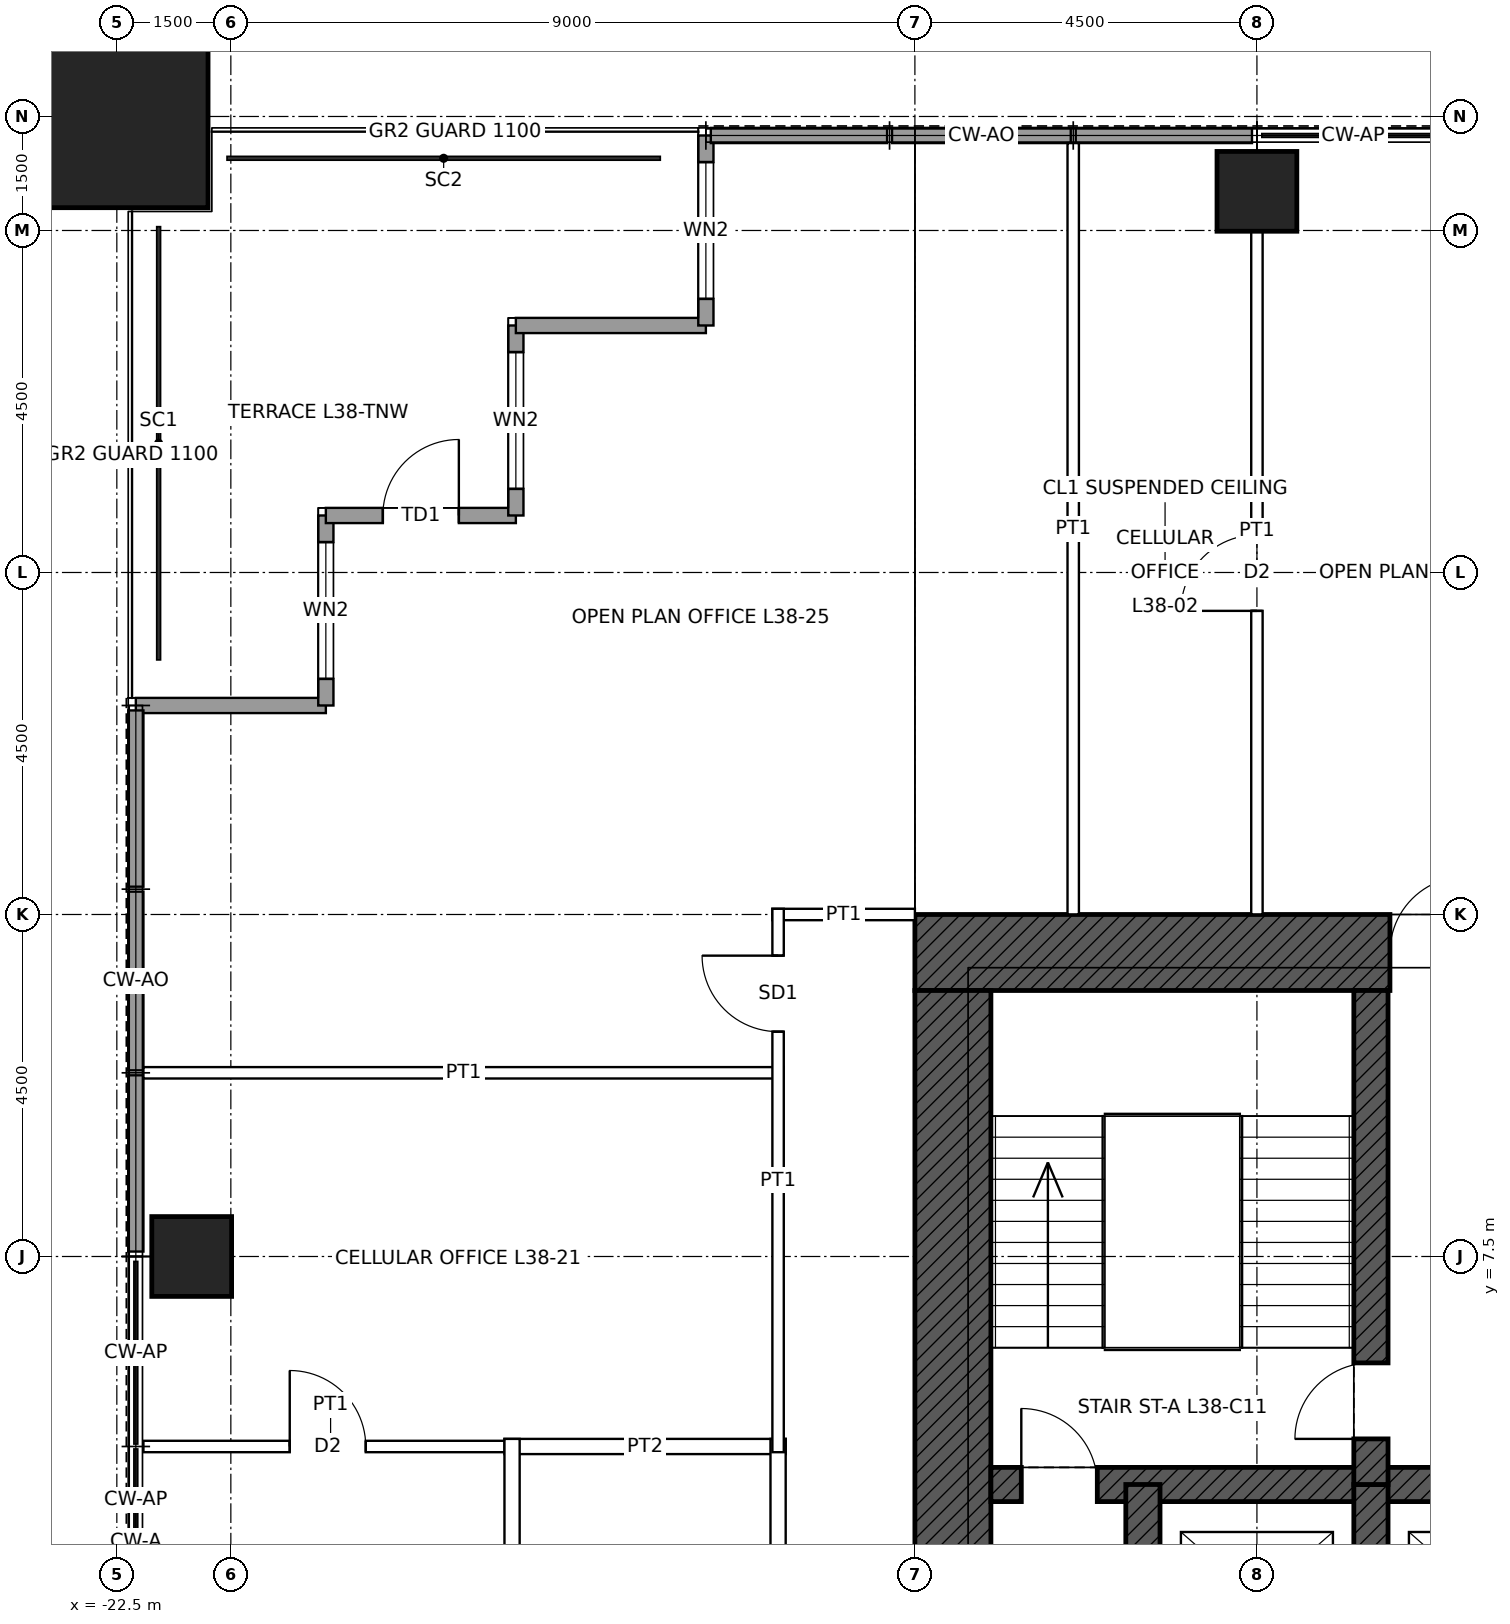
"""IFC4 building model, lengths in metres.
Left out: names, types, materials, properties, quantities, classifications, styles, units other than length and angle.
Written with IfcOpenShell. Run it as: python <this file> out.ifc"""

import sys

from ifc_helpers import new_model, si_unit, direction, frame, frame_2d, origin, origin_2d, place, context, subcontext, project, spatial, rectangle, hollow_rectangle, extrude, element, fill, save


model = new_model("IFC4")
c1 = context("Model", 3, precision=1e-05, world=origin(), true_north=direction((0.0, 1.0)))
c2 = subcontext(c1, "Body", "Model", "MODEL_VIEW")
j1 = project(units=[si_unit("LENGTHUNIT", "METRE"), si_unit("PLANEANGLEUNIT", "RADIAN")], contexts=[c1])
p1 = place(None, origin())
s1 = spatial("IfcSite", under=j1, at=p1, CompositionType="ELEMENT")
p2 = place(p1, origin())
s2 = spatial("IfcBuilding", under=s1, at=p2, CompositionType="ELEMENT")
p3 = place(p2, frame((0.0, 0.0, 185.9)))
s3 = spatial("IfcBuildingStorey", under=s2, at=p3, CompositionType="ELEMENT", Elevation=185.9)
p4 = place(p3, frame((-22.5, 22.5, 0.0), z_axis=(0.0, 0.0, 1.0), x_axis=(1.0, 0.0, 0.0)))
e1 = element("IfcColumn", 1, at=p4, inside=s3, PredefinedType="COLUMN", context=c2, shape_type="SweptSolid", body=[
    extrude(hollow_rectangle(XDim=2.4, YDim=2.4, WallThickness=0.12, at=origin_2d()), origin(), (0.0, 0.0, 1.0), 4.0),
])
for number, where, z_axis, x_axis in (
    (2, (-7.5, 21.515, 0.0), (0.0, 0.0, 1.0), (1.0, 0.0, 0.0)),
    (3, (-21.515, 7.5, 0.0), (0.0, 0.0, 1.0), (1.0, 0.0, 0.0)),
):
    element("IfcColumn", number, at=place(p3, frame(where, z_axis=z_axis, x_axis=x_axis)), inside=s3, PredefinedType="COLUMN", context=c2, shape_type="SweptSolid", body=[
        extrude(hollow_rectangle(XDim=1.05, YDim=1.05, WallThickness=0.07, at=origin_2d()), origin(), (0.0, 0.0, 1.0), 4.0),
    ])
p5 = place(p3, frame((-12.0, 11.5, 0.0), z_axis=(0.0, 0.0, 1.0), x_axis=(1.0, 0.0, 0.0)))
e4 = element("IfcWall", 4, at=p5, inside=s3, PredefinedType="SHEAR", context=c2, shape_type="SweptSolid", body=[
    extrude(rectangle(XDim=24.0, YDim=1.0, at=frame_2d((12.0, 0.0))), origin(), (0.0, 0.0, 1.0), 4.0),
])
p6 = place(p5, frame((6.25, 0.0, 0.0)))
e5 = element("IfcOpeningElement", 5, at=p6, cuts=e4, PredefinedType="OPENING", context=c2, shape_type="SweptSolid", body=[
    extrude(rectangle(XDim=1.0, YDim=2.4, at=frame_2d((0.5, 1.2))), frame((0.0, 0.51, 0.0), z_axis=(0.0, -1.0, 0.0), x_axis=(1.0, 0.0, 0.0)), (0.0, 0.0, 1.0), 1.02),
])
p7 = place(p5, frame((16.75, 0.0, 0.0)))
e6 = element("IfcOpeningElement", 6, at=p7, cuts=e4, PredefinedType="OPENING", context=c2, shape_type="SweptSolid", body=[
    extrude(rectangle(XDim=1.0, YDim=2.4, at=frame_2d((0.5, 1.2))), frame((0.0, 0.51, 0.0), z_axis=(0.0, -1.0, 0.0), x_axis=(1.0, 0.0, 0.0)), (0.0, 0.0, 1.0), 1.02),
])
p8 = place(p3, frame((-11.5, -11.0, 0.0), z_axis=(0.0, 0.0, 1.0), x_axis=(0.0, 1.0, 0.0)))
e7 = element("IfcWall", 7, at=p8, inside=s3, PredefinedType="SHEAR", context=c2, shape_type="SweptSolid", body=[
    extrude(rectangle(XDim=22.0, YDim=1.0, at=frame_2d((11.0, 0.0))), origin(), (0.0, 0.0, 1.0), 4.0),
])
p9 = place(p8, frame((10.5, 0.0, 0.0)))
e8 = element("IfcOpeningElement", 8, at=p9, cuts=e7, PredefinedType="OPENING", context=c2, shape_type="SweptSolid", body=[
    extrude(rectangle(XDim=1.0, YDim=2.4, at=frame_2d((0.5, 1.2))), frame((0.0, 0.51, 0.0), z_axis=(0.0, -1.0, 0.0), x_axis=(1.0, 0.0, 0.0)), (0.0, 0.0, 1.0), 1.02),
])
p10 = place(p3, frame((-11.0, 4.5, 0.0), z_axis=(0.0, 0.0, 1.0), x_axis=(1.0, 0.0, 0.0)))
e9 = element("IfcWall", 9, at=p10, inside=s3, PredefinedType="SHEAR", context=c2, shape_type="SweptSolid", body=[
    extrude(rectangle(XDim=22.0, YDim=0.45, at=frame_2d((11.0, 0.0))), origin(), (0.0, 0.0, 1.0), 4.0),
])
p11 = place(p10, frame((0.4, 0.0, 0.0)))
e10 = element("IfcOpeningElement", 10, at=p11, cuts=e9, PredefinedType="OPENING", context=c2, shape_type="SweptSolid", body=[
    extrude(rectangle(XDim=1.0, YDim=2.1, at=frame_2d((0.5, 1.05))), frame((0.0, 0.235, 0.0), z_axis=(0.0, -1.0, 0.0), x_axis=(1.0, 0.0, 0.0)), (0.0, 0.0, 1.0), 0.47),
])
p12 = place(p10, frame((20.6, 0.0, 0.0)))
e11 = element("IfcOpeningElement", 11, at=p12, cuts=e9, PredefinedType="OPENING", context=c2, shape_type="SweptSolid", body=[
    extrude(rectangle(XDim=1.0, YDim=2.1, at=frame_2d((0.5, 1.05))), frame((0.0, 0.235, 0.0), z_axis=(0.0, -1.0, 0.0), x_axis=(1.0, 0.0, 0.0)), (0.0, 0.0, 1.0), 0.47),
])
for number, where, z_axis, x_axis in (
    (12, (-9.0, 1.5, 0.0), (0.0, 0.0, 1.0), (0.0, 1.0, 0.0)),
    (13, (-6.0, 1.5, 0.0), (0.0, 0.0, 1.0), (0.0, 1.0, 0.0)),
):
    element("IfcWall", number, at=place(p3, frame(where, z_axis=z_axis, x_axis=x_axis)), inside=s3, PredefinedType="SHEAR", context=c2, shape_type="SweptSolid", body=[
        extrude(rectangle(XDim=3.0, YDim=0.45, at=frame_2d((1.5, 0.0))), origin(), (0.0, 0.0, 1.0), 4.0),
    ])
p13 = place(p3, frame((-6.0, 4.5, 0.0), z_axis=(0.0, 0.0, 1.0), x_axis=(0.0, 1.0, 0.0)))
e14 = element("IfcWall", 14, at=p13, inside=s3, PredefinedType="SHEAR", context=c2, shape_type="SweptSolid", body=[
    extrude(rectangle(XDim=6.5, YDim=0.45, at=frame_2d((3.25, 0.0))), origin(), (0.0, 0.0, 1.0), 4.0),
])
p14 = place(p13, frame((0.6, 0.0, 0.0)))
e15 = element("IfcOpeningElement", 15, at=p14, cuts=e14, PredefinedType="OPENING", context=c2, shape_type="SweptSolid", body=[
    extrude(rectangle(XDim=1.0, YDim=2.1, at=frame_2d((0.5, 1.05))), frame((0.0, 0.235, 0.0), z_axis=(0.0, -1.0, 0.0), x_axis=(1.0, 0.0, 0.0)), (0.0, 0.0, 1.0), 0.47),
])
p15 = place(p3, frame((-22.25, 14.75, 0.0), z_axis=(0.0, 0.0, 1.0), x_axis=(1.0, 0.0, 0.0)))
e16 = element("IfcWall", 16, at=p15, inside=s3, PredefinedType="SOLIDWALL", context=c2, shape_type="SweptSolid", body=[
    extrude(rectangle(XDim=2.5, YDim=0.2, at=frame_2d((1.25, 0.0))), origin(), (0.0, 0.0, 1.0), 3.85),
])
p16 = place(p3, frame((-19.75, 14.75, 0.0), z_axis=(0.0, 0.0, 1.0), x_axis=(0.0, 1.0, 0.0)))
e17 = element("IfcWall", 17, at=p16, inside=s3, PredefinedType="SOLIDWALL", context=c2, shape_type="SweptSolid", body=[
    extrude(rectangle(XDim=2.5, YDim=0.2, at=frame_2d((1.25, 0.0))), origin(), (0.0, 0.0, 1.0), 3.85),
])
p17 = place(p16, frame((0.35, 0.0, 0.3)))
e18 = element("IfcOpeningElement", 18, at=p17, cuts=e17, PredefinedType="OPENING", context=c2, shape_type="SweptSolid", body=[
    extrude(rectangle(XDim=1.8, YDim=2.4, at=frame_2d((0.9, 1.2))), frame((0.0, 0.11, 0.0), z_axis=(0.0, -1.0, 0.0), x_axis=(1.0, 0.0, 0.0)), (0.0, 0.0, 1.0), 0.22),
])
p18 = place(p3, frame((-19.75, 17.25, 0.0), z_axis=(0.0, 0.0, 1.0), x_axis=(1.0, 0.0, 0.0)))
e19 = element("IfcWall", 19, at=p18, inside=s3, PredefinedType="SOLIDWALL", context=c2, shape_type="SweptSolid", body=[
    extrude(rectangle(XDim=2.5, YDim=0.2, at=frame_2d((1.25, 0.0))), origin(), (0.0, 0.0, 1.0), 3.85),
])
p19 = place(p18, frame((0.75, 0.0, 0.0)))
e20 = element("IfcOpeningElement", 20, at=p19, cuts=e19, PredefinedType="OPENING", context=c2, shape_type="SweptSolid", body=[
    extrude(rectangle(XDim=1.0, YDim=2.4, at=frame_2d((0.5, 1.2))), frame((0.0, 0.11, 0.0), z_axis=(0.0, -1.0, 0.0), x_axis=(1.0, 0.0, 0.0)), (0.0, 0.0, 1.0), 0.22),
])
p20 = place(p3, frame((-17.25, 17.25, 0.0), z_axis=(0.0, 0.0, 1.0), x_axis=(0.0, 1.0, 0.0)))
e21 = element("IfcWall", 21, at=p20, inside=s3, PredefinedType="SOLIDWALL", context=c2, shape_type="SweptSolid", body=[
    extrude(rectangle(XDim=2.5, YDim=0.2, at=frame_2d((1.25, 0.0))), origin(), (0.0, 0.0, 1.0), 3.85),
])
p21 = place(p20, frame((0.35, 0.0, 0.3)))
e22 = element("IfcOpeningElement", 22, at=p21, cuts=e21, PredefinedType="OPENING", context=c2, shape_type="SweptSolid", body=[
    extrude(rectangle(XDim=1.8, YDim=2.4, at=frame_2d((0.9, 1.2))), frame((0.0, 0.11, 0.0), z_axis=(0.0, -1.0, 0.0), x_axis=(1.0, 0.0, 0.0)), (0.0, 0.0, 1.0), 0.22),
])
p22 = place(p3, frame((-17.25, 19.75, 0.0), z_axis=(0.0, 0.0, 1.0), x_axis=(1.0, 0.0, 0.0)))
e23 = element("IfcWall", 23, at=p22, inside=s3, PredefinedType="SOLIDWALL", context=c2, shape_type="SweptSolid", body=[
    extrude(rectangle(XDim=2.5, YDim=0.2, at=frame_2d((1.25, 0.0))), origin(), (0.0, 0.0, 1.0), 3.85),
])
p23 = place(p3, frame((-14.75, 19.75, 0.0), z_axis=(0.0, 0.0, 1.0), x_axis=(0.0, 1.0, 0.0)))
e24 = element("IfcWall", 24, at=p23, inside=s3, PredefinedType="SOLIDWALL", context=c2, shape_type="SweptSolid", body=[
    extrude(rectangle(XDim=2.5, YDim=0.2, at=frame_2d((1.25, 0.0))), origin(), (0.0, 0.0, 1.0), 3.85),
])
p24 = place(p23, frame((0.35, 0.0, 0.3)))
e25 = element("IfcOpeningElement", 25, at=p24, cuts=e24, PredefinedType="OPENING", context=c2, shape_type="SweptSolid", body=[
    extrude(rectangle(XDim=1.8, YDim=2.4, at=frame_2d((0.9, 1.2))), frame((0.0, 0.11, 0.0), z_axis=(0.0, -1.0, 0.0), x_axis=(1.0, 0.0, 0.0)), (0.0, 0.0, 1.0), 0.22),
])
p25 = place(p3, frame((-14.685, 22.25, 0.0), z_axis=(0.0, 0.0, 1.0), x_axis=(1.0, 0.0, 0.0)))
e26 = element("IfcWall", 26, at=p25, inside=s3, PredefinedType="SOLIDWALL", context=c2, shape_type="SweptSolid", body=[
    extrude(rectangle(XDim=2.319, YDim=0.2, at=frame_2d((1.16, 0.0))), origin(), (0.0, 0.0, 1.0), 3.85),
])
p26 = place(p3, frame((-12.301, 22.25, 0.0), z_axis=(0.0, 0.0, 1.0), x_axis=(1.0, 0.0, 0.0)))
e27 = element("IfcWall", 27, at=p26, inside=s3, PredefinedType="SOLIDWALL", context=c2, shape_type="SweptSolid", body=[
    extrude(rectangle(XDim=2.352, YDim=0.2, at=frame_2d((1.176, 0.0))), origin(), (0.0, 0.0, 1.0), 3.85),
])
for number, where, z_axis, x_axis in (
    (28, (-9.884, 22.25, 0.0), (0.0, 0.0, 1.0), (1.0, 0.0, 0.0)),
    (29, (-22.25, 7.565, 0.0), (0.0, 0.0, 1.0), (0.0, 1.0, 0.0)),
):
    element("IfcWall", number, at=place(p3, frame(where, z_axis=z_axis, x_axis=x_axis)), inside=s3, PredefinedType="SOLIDWALL", context=c2, shape_type="SweptSolid", body=[
        extrude(rectangle(XDim=2.319, YDim=0.2, at=frame_2d((1.16, 0.0))), origin(), (0.0, 0.0, 1.0), 3.85),
    ])
p27 = place(p3, frame((-22.25, 9.949, 0.0), z_axis=(0.0, 0.0, 1.0), x_axis=(0.0, 1.0, 0.0)))
e30 = element("IfcWall", 30, at=p27, inside=s3, PredefinedType="SOLIDWALL", context=c2, shape_type="SweptSolid", body=[
    extrude(rectangle(XDim=2.352, YDim=0.2, at=frame_2d((1.176, 0.0))), origin(), (0.0, 0.0, 1.0), 3.85),
])
p28 = place(p3, frame((-22.25, 12.366, 0.0), z_axis=(0.0, 0.0, 1.0), x_axis=(0.0, 1.0, 0.0)))
e31 = element("IfcWall", 31, at=p28, inside=s3, PredefinedType="SOLIDWALL", context=c2, shape_type="SweptSolid", body=[
    extrude(rectangle(XDim=2.319, YDim=0.2, at=frame_2d((1.16, 0.0))), origin(), (0.0, 0.0, 1.0), 3.85),
])
p29 = place(p3, frame((-22.15, 5.0, 0.0), z_axis=(0.0, 0.0, 1.0), x_axis=(1.0, 0.0, 0.0)))
e32 = element("IfcWall", 32, at=p29, inside=s3, PredefinedType="PARTITIONING", context=c2, shape_type="SweptSolid", body=[
    extrude(rectangle(XDim=4.925, YDim=0.15, at=frame_2d((2.462, 0.0))), origin(), (0.0, 0.0, 1.0), 3.85),
])
p30 = place(p29, frame((1.925, 0.0, 0.0)))
e33 = element("IfcOpeningElement", 33, at=p30, cuts=e32, PredefinedType="OPENING", context=c2, shape_type="SweptSolid", body=[
    extrude(rectangle(XDim=1.0, YDim=2.1, at=frame_2d((0.5, 1.05))), frame((0.0, 0.085, 0.0), z_axis=(0.0, -1.0, 0.0), x_axis=(1.0, 0.0, 0.0)), (0.0, 0.0, 1.0), 0.17),
])
p31 = place(p3, frame((-17.4, 5.0, 0.0), z_axis=(0.0, 0.0, 1.0), x_axis=(1.0, 0.0, 0.0)))
e34 = element("IfcWall", 34, at=p31, inside=s3, PredefinedType="PARTITIONING", context=c2, shape_type="SweptSolid", body=[
    extrude(rectangle(XDim=3.7, YDim=0.2, at=frame_2d((1.85, 0.0))), origin(), (0.0, 0.0, 1.0), 3.85),
])
p32 = place(p3, frame((-22.15, 9.917, 0.0), z_axis=(0.0, 0.0, 1.0), x_axis=(1.0, 0.0, 0.0)))
e35 = element("IfcWall", 35, at=p32, inside=s3, PredefinedType="PARTITIONING", context=c2, shape_type="SweptSolid", body=[
    extrude(rectangle(XDim=8.425, YDim=0.15, at=frame_2d((4.212, 0.0))), origin(), (0.0, 0.0, 1.0), 3.85),
])
p33 = place(p3, frame((-13.875, 12.0, 0.0), z_axis=(0.0, 0.0, 1.0), x_axis=(1.0, 0.0, 0.0)))
e36 = element("IfcWall", 36, at=p33, inside=s3, PredefinedType="PARTITIONING", context=c2, shape_type="SweptSolid", body=[
    extrude(rectangle(XDim=1.875, YDim=0.15, at=frame_2d((0.938, 0.0))), origin(), (0.0, 0.0, 1.0), 3.85),
])
p34 = place(p3, frame((-17.3, -0.1, 0.0), z_axis=(0.0, 0.0, 1.0), x_axis=(0.0, 1.0, 0.0)))
e37 = element("IfcWall", 37, at=p34, inside=s3, PredefinedType="PARTITIONING", context=c2, shape_type="SweptSolid", body=[
    extrude(rectangle(XDim=5.2, YDim=0.2, at=frame_2d((2.6, 0.0))), origin(), (0.0, 0.0, 1.0), 3.85),
])
p35 = place(p34, frame((2.1, 0.0, 0.0)))
e38 = element("IfcOpeningElement", 38, at=p35, cuts=e37, PredefinedType="OPENING", context=c2, shape_type="SweptSolid", body=[
    extrude(rectangle(XDim=1.0, YDim=2.1, at=frame_2d((0.5, 1.05))), frame((0.0, 0.11, 0.0), z_axis=(0.0, -1.0, 0.0), x_axis=(1.0, 0.0, 0.0)), (0.0, 0.0, 1.0), 0.22),
])
p36 = place(p3, frame((-13.8, -0.1, 0.0), z_axis=(0.0, 0.0, 1.0), x_axis=(0.0, 1.0, 0.0)))
e39 = element("IfcWall", 39, at=p36, inside=s3, PredefinedType="PARTITIONING", context=c2, shape_type="SweptSolid", body=[
    extrude(rectangle(XDim=5.2, YDim=0.2, at=frame_2d((2.6, 0.0))), origin(), (0.0, 0.0, 1.0), 3.85),
])
p37 = place(p3, frame((-13.8, 4.925, 0.0), z_axis=(0.0, 0.0, 1.0), x_axis=(0.0, 1.0, 0.0)))
e40 = element("IfcWall", 40, at=p37, inside=s3, PredefinedType="PARTITIONING", context=c2, shape_type="SweptSolid", body=[
    extrude(rectangle(XDim=7.15, YDim=0.15, at=frame_2d((3.575, 0.0))), origin(), (0.0, 0.0, 1.0), 3.85),
])
p38 = place(p37, frame((5.533, 0.0, 0.0)))
e41 = element("IfcOpeningElement", 41, at=p38, cuts=e40, PredefinedType="OPENING", context=c2, shape_type="SweptSolid", body=[
    extrude(rectangle(XDim=1.0, YDim=2.4, at=frame_2d((0.5, 1.2))), frame((0.0, 0.085, 0.0), z_axis=(0.0, -1.0, 0.0), x_axis=(1.0, 0.0, 0.0)), (0.0, 0.0, 1.0), 0.17),
])
p39 = place(p3, frame((-9.917, 12.0, 0.0), z_axis=(0.0, 0.0, 1.0), x_axis=(0.0, 1.0, 0.0)))
e42 = element("IfcWall", 42, at=p39, inside=s3, PredefinedType="PARTITIONING", context=c2, shape_type="SweptSolid", body=[
    extrude(rectangle(XDim=10.15, YDim=0.15, at=frame_2d((5.075, 0.0))), origin(), (0.0, 0.0, 1.0), 3.85),
])
p40 = place(p3, frame((-7.5, 12.0, 0.0), z_axis=(0.0, 0.0, 1.0), x_axis=(0.0, 1.0, 0.0)))
e43 = element("IfcWall", 43, at=p40, inside=s3, PredefinedType="PARTITIONING", context=c2, shape_type="SweptSolid", body=[
    extrude(rectangle(XDim=8.99, YDim=0.15, at=frame_2d((4.495, 0.0))), origin(), (0.0, 0.0, 1.0), 3.238),
])
p41 = place(p40, frame((3.995, 0.0, 0.0)))
e44 = element("IfcOpeningElement", 44, at=p41, cuts=e43, PredefinedType="OPENING", context=c2, shape_type="SweptSolid", body=[
    extrude(rectangle(XDim=1.0, YDim=2.1, at=frame_2d((0.5, 1.05))), frame((0.0, 0.085, 0.0), z_axis=(0.0, -1.0, 0.0), x_axis=(1.0, 0.0, 0.0)), (0.0, 0.0, 1.0), 0.17),
])
p42 = place(p17, origin())
e45 = element("IfcWindow", 45, at=p42, inside=s3, PartitioningType="SINGLE_PANEL", PredefinedType="WINDOW", context=c2, shape_type="SweptSolid", body=[
    extrude(rectangle(XDim=1.8, YDim=2.4, at=frame_2d((0.9, 1.2))), frame((0.0, 0.03, 0.0), z_axis=(0.0, -1.0, 0.0), x_axis=(1.0, 0.0, 0.0)), (0.0, 0.0, 1.0), 0.06),
])
fill(e18, e45)
p43 = place(p19, origin())
e46 = element("IfcDoor", 46, at=p43, inside=s3, OperationType="SINGLE_SWING_RIGHT", PredefinedType="DOOR", context=c2, shape_type="SweptSolid", body=[
    extrude(rectangle(XDim=1.0, YDim=2.4, at=frame_2d((0.5, 1.2))), frame((0.0, 0.025, 0.0), z_axis=(0.0, -1.0, 0.0), x_axis=(1.0, 0.0, 0.0)), (0.0, 0.0, 1.0), 0.05),
])
fill(e20, e46)
p44 = place(p21, origin())
e47 = element("IfcWindow", 47, at=p44, inside=s3, PartitioningType="SINGLE_PANEL", PredefinedType="WINDOW", context=c2, shape_type="SweptSolid", body=[
    extrude(rectangle(XDim=1.8, YDim=2.4, at=frame_2d((0.9, 1.2))), frame((0.0, 0.03, 0.0), z_axis=(0.0, -1.0, 0.0), x_axis=(1.0, 0.0, 0.0)), (0.0, 0.0, 1.0), 0.06),
])
fill(e22, e47)
p45 = place(p24, origin())
e48 = element("IfcWindow", 48, at=p45, inside=s3, PartitioningType="SINGLE_PANEL", PredefinedType="WINDOW", context=c2, shape_type="SweptSolid", body=[
    extrude(rectangle(XDim=1.8, YDim=2.4, at=frame_2d((0.9, 1.2))), frame((0.0, 0.03, 0.0), z_axis=(0.0, -1.0, 0.0), x_axis=(1.0, 0.0, 0.0)), (0.0, 0.0, 1.0), 0.06),
])
fill(e25, e48)
p46 = place(p11, origin())
e49 = element("IfcDoor", 49, at=p46, inside=s3, OperationType="SINGLE_SWING_LEFT", PredefinedType="DOOR", context=c2, shape_type="SweptSolid", body=[
    extrude(rectangle(XDim=1.0, YDim=2.1, at=frame_2d((0.5, 1.05))), frame((0.0, 0.025, 0.0), z_axis=(0.0, -1.0, 0.0), x_axis=(1.0, 0.0, 0.0)), (0.0, 0.0, 1.0), 0.05),
])
fill(e10, e49)
p47 = place(p14, origin())
e50 = element("IfcDoor", 50, at=p47, inside=s3, OperationType="SINGLE_SWING_LEFT", PredefinedType="DOOR", context=c2, shape_type="SweptSolid", body=[
    extrude(rectangle(XDim=1.0, YDim=2.1, at=frame_2d((0.5, 1.05))), frame((0.0, 0.025, 0.0), z_axis=(0.0, -1.0, 0.0), x_axis=(1.0, 0.0, 0.0)), (0.0, 0.0, 1.0), 0.05),
])
fill(e15, e50)
p48 = place(p6, origin())
e51 = element("IfcDoor", 51, at=p48, inside=s3, OperationType="SINGLE_SWING_RIGHT", PredefinedType="DOOR", context=c2, shape_type="SweptSolid", body=[
    extrude(rectangle(XDim=1.0, YDim=2.4, at=frame_2d((0.5, 1.2))), frame((0.0, 0.485, 0.0), z_axis=(0.0, -1.0, 0.0), x_axis=(1.0, 0.0, 0.0)), (0.0, 0.0, 1.0), 0.05),
])
fill(e5, e51)
p49 = place(p41, origin())
e52 = element("IfcDoor", 52, at=p49, inside=s3, OperationType="SINGLE_SWING_LEFT", PredefinedType="DOOR", context=c2, shape_type="SweptSolid", body=[
    extrude(rectangle(XDim=1.0, YDim=2.1, at=frame_2d((0.5, 1.05))), frame((0.0, 0.025, 0.0), z_axis=(0.0, -1.0, 0.0), x_axis=(1.0, 0.0, 0.0)), (0.0, 0.0, 1.0), 0.05),
])
fill(e44, e52)
p50 = place(p30, origin())
e53 = element("IfcDoor", 53, at=p50, inside=s3, OperationType="SINGLE_SWING_LEFT", PredefinedType="DOOR", context=c2, shape_type="SweptSolid", body=[
    extrude(rectangle(XDim=1.0, YDim=2.1, at=frame_2d((0.5, 1.05))), frame((0.0, 0.025, 0.0), z_axis=(0.0, -1.0, 0.0), x_axis=(1.0, 0.0, 0.0)), (0.0, 0.0, 1.0), 0.05),
])
fill(e33, e53)
p51 = place(p38, origin())
e54 = element("IfcDoor", 54, at=p51, inside=s3, OperationType="SINGLE_SWING_RIGHT", PredefinedType="DOOR", context=c2, shape_type="SweptSolid", body=[
    extrude(rectangle(XDim=1.0, YDim=2.4, at=frame_2d((0.5, 1.2))), frame((0.0, 0.025, 0.0), z_axis=(0.0, -1.0, 0.0), x_axis=(1.0, 0.0, 0.0)), (0.0, 0.0, 1.0), 0.05),
])
fill(e41, e54)
save(model, sys.argv[1])
